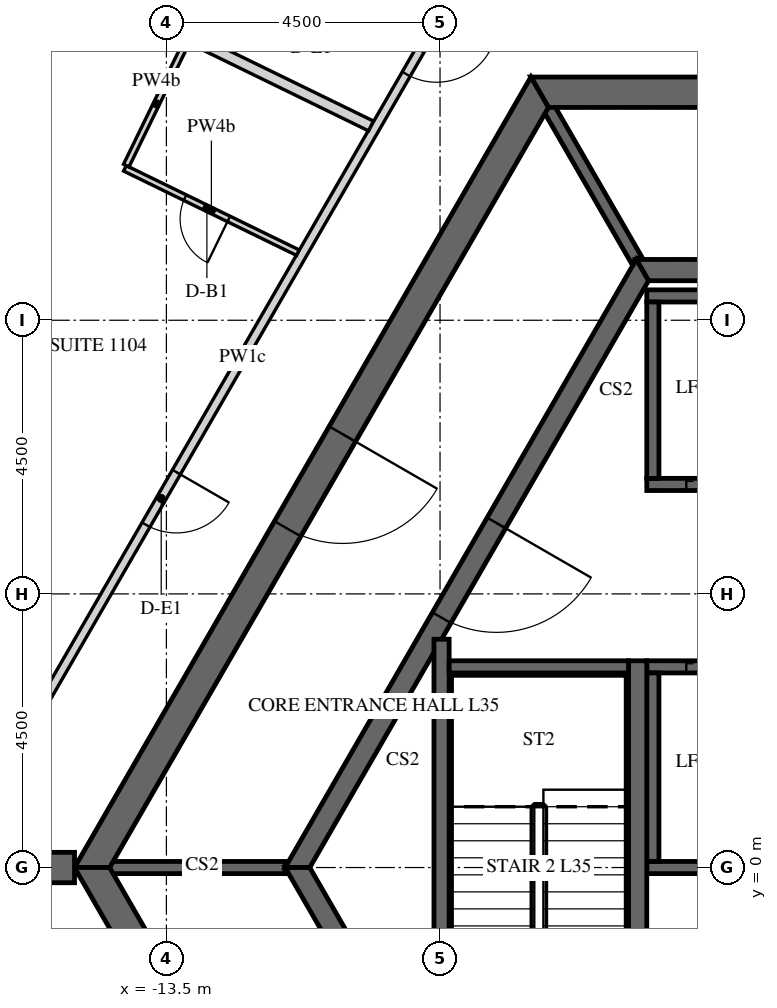
"""IFC4 building model, lengths in metres.
Left out: names, types, materials, properties, quantities, classifications, styles, units other than length and angle.
Written with IfcOpenShell. Run it as: python <this file> out.ifc"""

import sys

from ifc_helpers import new_model, si_unit, direction, frame, frame_2d, origin, place, context, subcontext, project, spatial, polyline, rectangle, outline, extrude, element, fill, save


model = new_model("IFC4")
c1 = context("Model", 3, precision=1e-05, world=origin(), true_north=direction((0.0, 1.0)))
c2 = subcontext(c1, "Body", "Model", "MODEL_VIEW")
j1 = project(units=[si_unit("LENGTHUNIT", "METRE"), si_unit("PLANEANGLEUNIT", "RADIAN")], contexts=[c1])
p1 = place(None, origin())
s1 = spatial("IfcSite", under=j1, at=p1, CompositionType="ELEMENT")
p2 = place(p1, origin())
s2 = spatial("IfcBuilding", under=s1, at=p2, CompositionType="ELEMENT")
p3 = place(p2, frame((0.0, 0.0, 152.7)))
s3 = spatial("IfcBuildingStorey", under=s2, at=p3, CompositionType="ELEMENT", Elevation=152.7)
p4 = place(p3, frame((-7.361, 12.75, 0.0), z_axis=(0.0, 0.0, 1.0), x_axis=(-0.50000571537, -0.866022103989, 0.0)))
e1 = element("IfcWall", 1, at=p4, inside=s3, PredefinedType="SHEAR", context=c2, shape_type="SweptSolid", body=[
    extrude(outline(polyline([(-0.144, -0.25), (14.867, -0.25), (14.578, 0.25), (0.144, 0.25), (-0.144, -0.25)])), origin(), (0.0, 0.0, 1.0), 3.75),
])
p5 = place(p4, frame((6.49, 0.0, 0.0)))
e2 = element("IfcOpeningElement", 2, at=p5, cuts=e1, PredefinedType="OPENING", context=c2, shape_type="SweptSolid", body=[
    extrude(rectangle(XDim=1.8, YDim=2.4, at=frame_2d((0.9, 1.2))), frame((0.0, 0.26, 0.0), z_axis=(0.0, -1.0, 0.0), x_axis=(1.0, 0.0, 0.0)), (0.0, 0.0, 1.0), 0.52),
])
p6 = place(p3, frame((-14.722, 0.0, 0.0), z_axis=(0.0, 0.0, 1.0), x_axis=(0.50000571537, -0.866022103989, 0.0)))
e3 = element("IfcWall", 3, at=p6, inside=s3, PredefinedType="SHEAR", context=c2, shape_type="SweptSolid", body=[
    extrude(outline(polyline([(-0.144, -0.25), (14.867, -0.25), (14.578, 0.25), (0.144, 0.25), (-0.144, -0.25)])), origin(), (0.0, 0.0, 1.0), 3.75),
])
p7 = place(p6, frame((6.432, 0.0, 0.0)))
e4 = element("IfcOpeningElement", 4, at=p7, cuts=e3, PredefinedType="OPENING", context=c2, shape_type="SweptSolid", body=[
    extrude(rectangle(XDim=1.8, YDim=2.4, at=frame_2d((0.9, 1.2))), frame((0.0, 0.26, 0.0), z_axis=(0.0, -1.0, 0.0), x_axis=(1.0, 0.0, 0.0)), (0.0, 0.0, 1.0), 0.52),
])
p8 = place(p3, frame((7.361, 12.75, 0.0), z_axis=(0.0, 0.0, 1.0), x_axis=(-1.0, 0.0, 0.0)))
e5 = element("IfcWall", 5, at=p8, inside=s3, PredefinedType="SHEAR", context=c2, shape_type="SweptSolid", body=[
    extrude(outline(polyline([(-0.144, -0.25), (14.866, -0.25), (14.578, 0.25), (0.144, 0.25), (-0.144, -0.25)])), origin(), (0.0, 0.0, 1.0), 3.75),
])
p9 = place(p8, frame((6.761, 0.0, 0.0)))
e6 = element("IfcOpeningElement", 6, at=p9, cuts=e5, PredefinedType="OPENING", context=c2, shape_type="SweptSolid", body=[
    extrude(rectangle(XDim=1.2, YDim=2.4, at=frame_2d((0.6, 1.2))), frame((0.0, 0.26, 0.0), z_axis=(0.0, -1.0, 0.0), x_axis=(1.0, 0.0, 0.0)), (0.0, 0.0, 1.0), 0.52),
])
p10 = place(p3, frame((-15.011, 0.0, 0.0), z_axis=(0.0, 0.0, 1.0), x_axis=(-1.0, 0.0, 0.0)))
e7 = element("IfcWall", 7, at=p10, inside=s3, PredefinedType="SHEAR", context=c2, shape_type="SweptSolid", body=[
    extrude(rectangle(XDim=15.424, YDim=0.5, at=frame_2d((7.712, 0.0))), origin(), (0.0, 0.0, 1.0), 3.75),
])
p11 = place(p10, frame((6.812, 0.0, 0.0)))
e8 = element("IfcOpeningElement", 8, at=p11, cuts=e7, PredefinedType="OPENING", context=c2, shape_type="SweptSolid", body=[
    extrude(rectangle(XDim=1.8, YDim=2.4, at=frame_2d((0.9, 1.2))), frame((0.0, 0.26, 0.0), z_axis=(0.0, -1.0, 0.0), x_axis=(1.0, 0.0, 0.0)), (0.0, 0.0, 1.0), 0.52),
])
p12 = place(p3, frame((-5.673, 9.825, 0.0), z_axis=(0.0, 0.0, 1.0), x_axis=(-0.499995046907, -0.866028263435, 0.0)))
e9 = element("IfcWall", 9, at=p12, inside=s3, PredefinedType="SHEAR", context=c2, shape_type="SweptSolid", body=[
    extrude(outline(polyline([(-0.101, -0.175), (11.446, -0.175), (11.244, 0.175), (0.101, 0.175), (-0.101, -0.175)])), origin(), (0.0, 0.0, 1.0), 3.75),
])
p13 = place(p12, frame((4.801, 0.0, 0.0)))
e10 = element("IfcOpeningElement", 10, at=p13, cuts=e9, PredefinedType="OPENING", context=c2, shape_type="SweptSolid", body=[
    extrude(rectangle(XDim=1.8, YDim=2.4, at=frame_2d((0.9, 1.2))), frame((0.0, 0.185, 0.0), z_axis=(0.0, -1.0, 0.0), x_axis=(1.0, 0.0, 0.0)), (0.0, 0.0, 1.0), 0.37),
])
p14 = place(p3, frame((-11.345, 0.0, 0.0), z_axis=(0.0, 0.0, 1.0), x_axis=(0.499995046907, -0.866028263435, 0.0)))
e11 = element("IfcWall", 11, at=p14, inside=s3, PredefinedType="SHEAR", context=c2, shape_type="SweptSolid", body=[
    extrude(outline(polyline([(-0.101, -0.175), (11.446, -0.175), (11.244, 0.175), (0.101, 0.175), (-0.101, -0.175)])), origin(), (0.0, 0.0, 1.0), 3.75),
])
p15 = place(p14, frame((4.744, 0.0, 0.0)))
e12 = element("IfcOpeningElement", 12, at=p15, cuts=e11, PredefinedType="OPENING", context=c2, shape_type="SweptSolid", body=[
    extrude(rectangle(XDim=1.8, YDim=2.4, at=frame_2d((0.9, 1.2))), frame((0.0, 0.185, 0.0), z_axis=(0.0, -1.0, 0.0), x_axis=(1.0, 0.0, 0.0)), (0.0, 0.0, 1.0), 0.37),
])
p16 = place(p3, frame((5.673, 9.825, 0.0), z_axis=(0.0, 0.0, 1.0), x_axis=(-1.0, 0.0, 0.0)))
e13 = element("IfcWall", 13, at=p16, inside=s3, PredefinedType="SHEAR", context=c2, shape_type="SweptSolid", body=[
    extrude(outline(polyline([(-0.101, -0.175), (11.446, -0.175), (11.244, 0.175), (0.101, 0.175), (-0.101, -0.175)])), origin(), (0.0, 0.0, 1.0), 3.75),
])
p17 = place(p3, frame((-5.6, 6.3, -0.5), z_axis=(0.0, 0.0, 1.0), x_axis=(1.0, 0.0, 0.0)))
e14 = element("IfcWall", 14, at=p17, inside=s3, PredefinedType="SHEAR", context=c2, shape_type="SweptSolid", body=[
    extrude(rectangle(XDim=11.2, YDim=0.2, at=frame_2d((5.6, 0.0))), origin(), (0.0, 0.0, 1.0), 4.15),
])
p18 = place(p17, frame((8.45, 0.0, 0.5)))
e15 = element("IfcOpeningElement", 15, at=p18, cuts=e14, PredefinedType="OPENING", context=c2, shape_type="SweptSolid", body=[
    extrude(rectangle(XDim=0.9, YDim=2.1, at=frame_2d((0.45, 1.05))), frame((0.0, 0.11, 0.0), z_axis=(0.0, -1.0, 0.0), x_axis=(1.0, 0.0, 0.0)), (0.0, 0.0, 1.0), 0.22),
])
p19 = place(p17, frame((0.65, 0.0, 0.5)))
e16 = element("IfcOpeningElement", 16, at=p19, cuts=e14, PredefinedType="OPENING", context=c2, shape_type="SweptSolid", body=[
    extrude(rectangle(XDim=1.1, YDim=2.1, at=frame_2d((0.55, 1.05))), frame((0.0, 0.11, 0.0), z_axis=(0.0, -1.0, 0.0), x_axis=(1.0, 0.0, 0.0)), (0.0, 0.0, 1.0), 0.22),
])
p20 = place(p17, frame((2.85, 0.0, 0.5)))
e17 = element("IfcOpeningElement", 17, at=p20, cuts=e14, PredefinedType="OPENING", context=c2, shape_type="SweptSolid", body=[
    extrude(rectangle(XDim=1.1, YDim=2.1, at=frame_2d((0.55, 1.05))), frame((0.0, 0.11, 0.0), z_axis=(0.0, -1.0, 0.0), x_axis=(1.0, 0.0, 0.0)), (0.0, 0.0, 1.0), 0.22),
])
p21 = place(p17, frame((5.05, 0.0, 0.5)))
e18 = element("IfcOpeningElement", 18, at=p21, cuts=e14, PredefinedType="OPENING", context=c2, shape_type="SweptSolid", body=[
    extrude(rectangle(XDim=1.1, YDim=2.1, at=frame_2d((0.55, 1.05))), frame((0.0, 0.11, 0.0), z_axis=(0.0, -1.0, 0.0), x_axis=(1.0, 0.0, 0.0)), (0.0, 0.0, 1.0), 0.22),
])
p22 = place(p3, frame((-5.6, 9.4, -0.5), z_axis=(0.0, 0.0, 1.0), x_axis=(1.0, 0.0, 0.0)))
e19 = element("IfcWall", 19, at=p22, inside=s3, PredefinedType="SHEAR", context=c2, shape_type="SweptSolid", body=[
    extrude(rectangle(XDim=11.2, YDim=0.2, at=frame_2d((5.6, 0.0))), origin(), (0.0, 0.0, 1.0), 4.15),
])
p23 = place(p3, frame((-5.5, 6.4, -0.5), z_axis=(0.0, 0.0, 1.0), x_axis=(0.0, 1.0, 0.0)))
e20 = element("IfcWall", 20, at=p23, inside=s3, PredefinedType="SHEAR", context=c2, shape_type="SweptSolid", body=[
    extrude(rectangle(XDim=2.9, YDim=0.2, at=frame_2d((1.45, 0.0))), origin(), (0.0, 0.0, 1.0), 4.15),
])
p24 = place(p3, frame((-5.6, 3.3, -0.5), z_axis=(0.0, 0.0, 1.0), x_axis=(1.0, 0.0, 0.0)))
e21 = element("IfcWall", 21, at=p24, inside=s3, PredefinedType="SHEAR", context=c2, shape_type="SweptSolid", body=[
    extrude(rectangle(XDim=11.2, YDim=0.2, at=frame_2d((5.6, 0.0))), origin(), (0.0, 0.0, 1.0), 4.15),
])
p25 = place(p24, frame((0.65, 0.0, 0.5)))
e22 = element("IfcOpeningElement", 22, at=p25, cuts=e21, PredefinedType="OPENING", context=c2, shape_type="SweptSolid", body=[
    extrude(rectangle(XDim=1.1, YDim=2.1, at=frame_2d((0.55, 1.05))), frame((0.0, 0.11, 0.0), z_axis=(0.0, -1.0, 0.0), x_axis=(1.0, 0.0, 0.0)), (0.0, 0.0, 1.0), 0.22),
])
p26 = place(p24, frame((2.85, 0.0, 0.5)))
e23 = element("IfcOpeningElement", 23, at=p26, cuts=e21, PredefinedType="OPENING", context=c2, shape_type="SweptSolid", body=[
    extrude(rectangle(XDim=1.1, YDim=2.1, at=frame_2d((0.55, 1.05))), frame((0.0, 0.11, 0.0), z_axis=(0.0, -1.0, 0.0), x_axis=(1.0, 0.0, 0.0)), (0.0, 0.0, 1.0), 0.22),
])
p27 = place(p24, frame((5.05, 0.0, 0.5)))
e24 = element("IfcOpeningElement", 24, at=p27, cuts=e21, PredefinedType="OPENING", context=c2, shape_type="SweptSolid", body=[
    extrude(rectangle(XDim=1.1, YDim=2.1, at=frame_2d((0.55, 1.05))), frame((0.0, 0.11, 0.0), z_axis=(0.0, -1.0, 0.0), x_axis=(1.0, 0.0, 0.0)), (0.0, 0.0, 1.0), 0.22),
])
p28 = place(p24, frame((7.25, 0.0, 0.5)))
e25 = element("IfcOpeningElement", 25, at=p28, cuts=e21, PredefinedType="OPENING", context=c2, shape_type="SweptSolid", body=[
    extrude(rectangle(XDim=1.1, YDim=2.1, at=frame_2d((0.55, 1.05))), frame((0.0, 0.11, 0.0), z_axis=(0.0, -1.0, 0.0), x_axis=(1.0, 0.0, 0.0)), (0.0, 0.0, 1.0), 0.22),
])
p29 = place(p24, frame((9.45, 0.0, 0.5)))
e26 = element("IfcOpeningElement", 26, at=p29, cuts=e21, PredefinedType="OPENING", context=c2, shape_type="SweptSolid", body=[
    extrude(rectangle(XDim=1.1, YDim=2.1, at=frame_2d((0.55, 1.05))), frame((0.0, 0.11, 0.0), z_axis=(0.0, -1.0, 0.0), x_axis=(1.0, 0.0, 0.0)), (0.0, 0.0, 1.0), 0.22),
])
p30 = place(p3, frame((-5.6, 0.0, -0.5), z_axis=(0.0, 0.0, 1.0), x_axis=(1.0, 0.0, 0.0)))
e27 = element("IfcWall", 27, at=p30, inside=s3, PredefinedType="SHEAR", context=c2, shape_type="SweptSolid", body=[
    extrude(rectangle(XDim=11.2, YDim=0.2, at=frame_2d((5.6, 0.0))), origin(), (0.0, 0.0, 1.0), 4.15),
])
p31 = place(p3, frame((-5.5, 0.1, -0.5), z_axis=(0.0, 0.0, 1.0), x_axis=(0.0, 1.0, 0.0)))
e28 = element("IfcWall", 28, at=p31, inside=s3, PredefinedType="SHEAR", context=c2, shape_type="SweptSolid", body=[
    extrude(rectangle(XDim=3.1, YDim=0.2, at=frame_2d((1.55, 0.0))), origin(), (0.0, 0.0, 1.0), 4.15),
])
for number, where, z_axis, x_axis in (
    (29, (-5.773, 10.0, 0.0), (0.0, 0.0, 1.0), (-0.5, 0.866, 0.0)),
    (30, (-11.547, 0.0, 0.0), (0.0, 0.0, 1.0), (-1.0, 0.0, 0.0)),
):
    element("IfcWall", number, at=place(p3, frame(where, z_axis=z_axis, x_axis=x_axis)), inside=s3, PredefinedType="SHEAR", context=c2, shape_type="SweptSolid", body=[
        extrude(rectangle(XDim=2.887, YDim=0.2, at=frame_2d((1.443, 0.0))), origin(), (0.0, 0.0, 1.0), 3.75),
    ])
p32 = place(p3, frame((-5.75, -3.4, -0.5), z_axis=(0.0, 0.0, 1.0), x_axis=(0.0, 1.0, 0.0)))
e31 = element("IfcWall", 31, at=p32, inside=s3, PredefinedType="SHEAR", context=c2, shape_type="SweptSolid", body=[
    extrude(rectangle(XDim=6.8, YDim=0.3, at=frame_2d((3.4, 0.0))), origin(), (0.0, 0.0, 1.0), 4.15),
])
p33 = place(p3, frame((-8.975, -3.755, -0.5), z_axis=(0.0, 0.0, 1.0), x_axis=(0.0, 1.0, 0.0)))
e32 = element("IfcWall", 32, at=p33, inside=s3, PredefinedType="SHEAR", context=c2, shape_type="SweptSolid", body=[
    extrude(rectangle(XDim=7.51, YDim=0.25, at=frame_2d((3.755, 0.0))), origin(), (0.0, 0.0, 1.0), 4.15),
])
p34 = place(p3, frame((-8.85, 3.3, -0.5), z_axis=(0.0, 0.0, 1.0), x_axis=(1.0, 0.0, 0.0)))
e33 = element("IfcWall", 33, at=p34, inside=s3, PredefinedType="SHEAR", context=c2, shape_type="SweptSolid", body=[
    extrude(rectangle(XDim=2.95, YDim=0.2, at=frame_2d((1.475, 0.0))), origin(), (0.0, 0.0, 1.0), 4.15),
])
p35 = place(p3, frame((-8.588, 14.725, 0.0), z_axis=(0.0, 0.0, 1.0), x_axis=(-0.499996322767, -0.866027526826, 0.0)))
e34 = element("IfcWall", 34, at=p35, inside=s3, PredefinedType="PARTITIONING", context=c2, shape_type="SweptSolid", body=[
    extrude(rectangle(XDim=14.636, YDim=0.15, at=frame_2d((7.318, 0.0))), origin(), (0.0, 0.0, 1.0), 2.823),
])
p36 = place(p35, frame((0.936, 0.0, 0.0)))
e35 = element("IfcOpeningElement", 35, at=p36, cuts=e34, PredefinedType="OPENING", context=c2, shape_type="SweptSolid", body=[
    extrude(rectangle(XDim=1.0, YDim=2.1, at=frame_2d((0.5, 1.05))), frame((0.0, 0.085, 0.0), z_axis=(0.0, -1.0, 0.0), x_axis=(1.0, 0.0, 0.0)), (0.0, 0.0, 1.0), 0.17),
])
p37 = place(p35, frame((9.495, 0.0, 0.0)))
e36 = element("IfcOpeningElement", 36, at=p37, cuts=e34, PredefinedType="OPENING", context=c2, shape_type="SweptSolid", body=[
    extrude(rectangle(XDim=1.0, YDim=2.1, at=frame_2d((0.5, 1.05))), frame((0.0, 0.085, 0.0), z_axis=(0.0, -1.0, 0.0), x_axis=(1.0, 0.0, 0.0)), (0.0, 0.0, 1.0), 0.17),
])
p38 = place(p3, frame((-21.815, 17.892, 0.0), z_axis=(0.0, 0.0, 1.0), x_axis=(0.898798778742, -0.43836144371, 0.0)))
e37 = element("IfcWall", 37, at=p38, inside=s3, PredefinedType="PARTITIONING", context=c2, shape_type="SweptSolid", body=[
    extrude(rectangle(XDim=12.994, YDim=0.18, at=frame_2d((6.497, 0.0))), origin(), (0.0, 0.0, 1.0), 2.823),
])
p39 = place(p3, frame((-11.338, 10.112, 0.0), z_axis=(0.0, 0.0, 1.0), x_axis=(-0.898781792608, 0.438396269688, 0.0)))
e38 = element("IfcWall", 38, at=p39, inside=s3, PredefinedType="PARTITIONING", context=c2, shape_type="SweptSolid", body=[
    extrude(rectangle(XDim=3.164, YDim=0.1, at=frame_2d((1.582, 0.0))), origin(), (0.0, 0.0, 1.0), 2.823),
])
p40 = place(p39, frame((1.264, 0.0, 0.0)))
e39 = element("IfcOpeningElement", 39, at=p40, cuts=e38, PredefinedType="OPENING", context=c2, shape_type="SweptSolid", body=[
    extrude(rectangle(XDim=0.8, YDim=2.1, at=frame_2d((0.4, 1.05))), frame((0.0, 0.06, 0.0), z_axis=(0.0, -1.0, 0.0), x_axis=(1.0, 0.0, 0.0)), (0.0, 0.0, 1.0), 0.12),
])
p41 = place(p3, frame((-14.16, 11.544, 0.0), z_axis=(0.0, 0.0, 1.0), x_axis=(0.438376807268, 0.898791285477, 0.0)))
e40 = element("IfcWall", 40, at=p41, inside=s3, PredefinedType="PARTITIONING", context=c2, shape_type="SweptSolid", body=[
    extrude(rectangle(XDim=2.26, YDim=0.1, at=frame_2d((1.13, 0.0))), origin(), (0.0, 0.0, 1.0), 2.823),
])
p42 = place(p5, origin())
e41 = element("IfcDoor", 41, at=p42, inside=s3, OperationType="DOUBLE_DOOR_SINGLE_SWING", PredefinedType="DOOR", context=c2, shape_type="SweptSolid", body=[
    extrude(rectangle(XDim=1.8, YDim=2.4, at=frame_2d((0.9, 1.2))), frame((0.0, 0.025, 0.0), z_axis=(0.0, -1.0, 0.0), x_axis=(1.0, 0.0, 0.0)), (0.0, 0.0, 1.0), 0.05),
])
fill(e2, e41)
p43 = place(p13, origin())
e42 = element("IfcDoor", 42, at=p43, inside=s3, OperationType="DOUBLE_DOOR_SINGLE_SWING", PredefinedType="DOOR", context=c2, shape_type="SweptSolid", body=[
    extrude(rectangle(XDim=1.8, YDim=2.4, at=frame_2d((0.9, 1.2))), frame((0.0, 0.025, 0.0), z_axis=(0.0, -1.0, 0.0), x_axis=(1.0, 0.0, 0.0)), (0.0, 0.0, 1.0), 0.05),
])
fill(e10, e42)
p44 = place(p19, origin())
e43 = element("IfcDoor", 43, at=p44, inside=s3, OperationType="SLIDING_TO_LEFT", PredefinedType="DOOR", context=c2, shape_type="SweptSolid", body=[
    extrude(rectangle(XDim=1.1, YDim=2.1, at=frame_2d((0.55, 1.05))), frame((0.0, 0.025, 0.0), z_axis=(0.0, -1.0, 0.0), x_axis=(1.0, 0.0, 0.0)), (0.0, 0.0, 1.0), 0.05),
])
fill(e16, e43)
p45 = place(p25, origin())
e44 = element("IfcDoor", 44, at=p45, inside=s3, OperationType="SLIDING_TO_LEFT", PredefinedType="DOOR", context=c2, shape_type="SweptSolid", body=[
    extrude(rectangle(XDim=1.1, YDim=2.1, at=frame_2d((0.55, 1.05))), frame((0.0, 0.025, 0.0), z_axis=(0.0, -1.0, 0.0), x_axis=(1.0, 0.0, 0.0)), (0.0, 0.0, 1.0), 0.05),
])
fill(e22, e44)
p46 = place(p36, origin())
e45 = element("IfcDoor", 45, at=p46, inside=s3, OperationType="SINGLE_SWING_RIGHT", PredefinedType="DOOR", context=c2, shape_type="SweptSolid", body=[
    extrude(rectangle(XDim=1.0, YDim=2.1, at=frame_2d((0.5, 1.05))), frame((0.0, 0.025, 0.0), z_axis=(0.0, -1.0, 0.0), x_axis=(1.0, 0.0, 0.0)), (0.0, 0.0, 1.0), 0.05),
])
fill(e35, e45)
p47 = place(p37, origin())
e46 = element("IfcDoor", 46, at=p47, inside=s3, OperationType="SINGLE_SWING_RIGHT", PredefinedType="DOOR", context=c2, shape_type="SweptSolid", body=[
    extrude(rectangle(XDim=1.0, YDim=2.1, at=frame_2d((0.5, 1.05))), frame((0.0, 0.025, 0.0), z_axis=(0.0, -1.0, 0.0), x_axis=(1.0, 0.0, 0.0)), (0.0, 0.0, 1.0), 0.05),
])
fill(e36, e46)
p48 = place(p40, origin())
e47 = element("IfcDoor", 47, at=p48, inside=s3, OperationType="SINGLE_SWING_LEFT", PredefinedType="DOOR", context=c2, shape_type="SweptSolid", body=[
    extrude(rectangle(XDim=0.8, YDim=2.1, at=frame_2d((0.4, 1.05))), frame((0.0, 0.025, 0.0), z_axis=(0.0, -1.0, 0.0), x_axis=(1.0, 0.0, 0.0)), (0.0, 0.0, 1.0), 0.05),
])
fill(e39, e47)
save(model, sys.argv[1])
